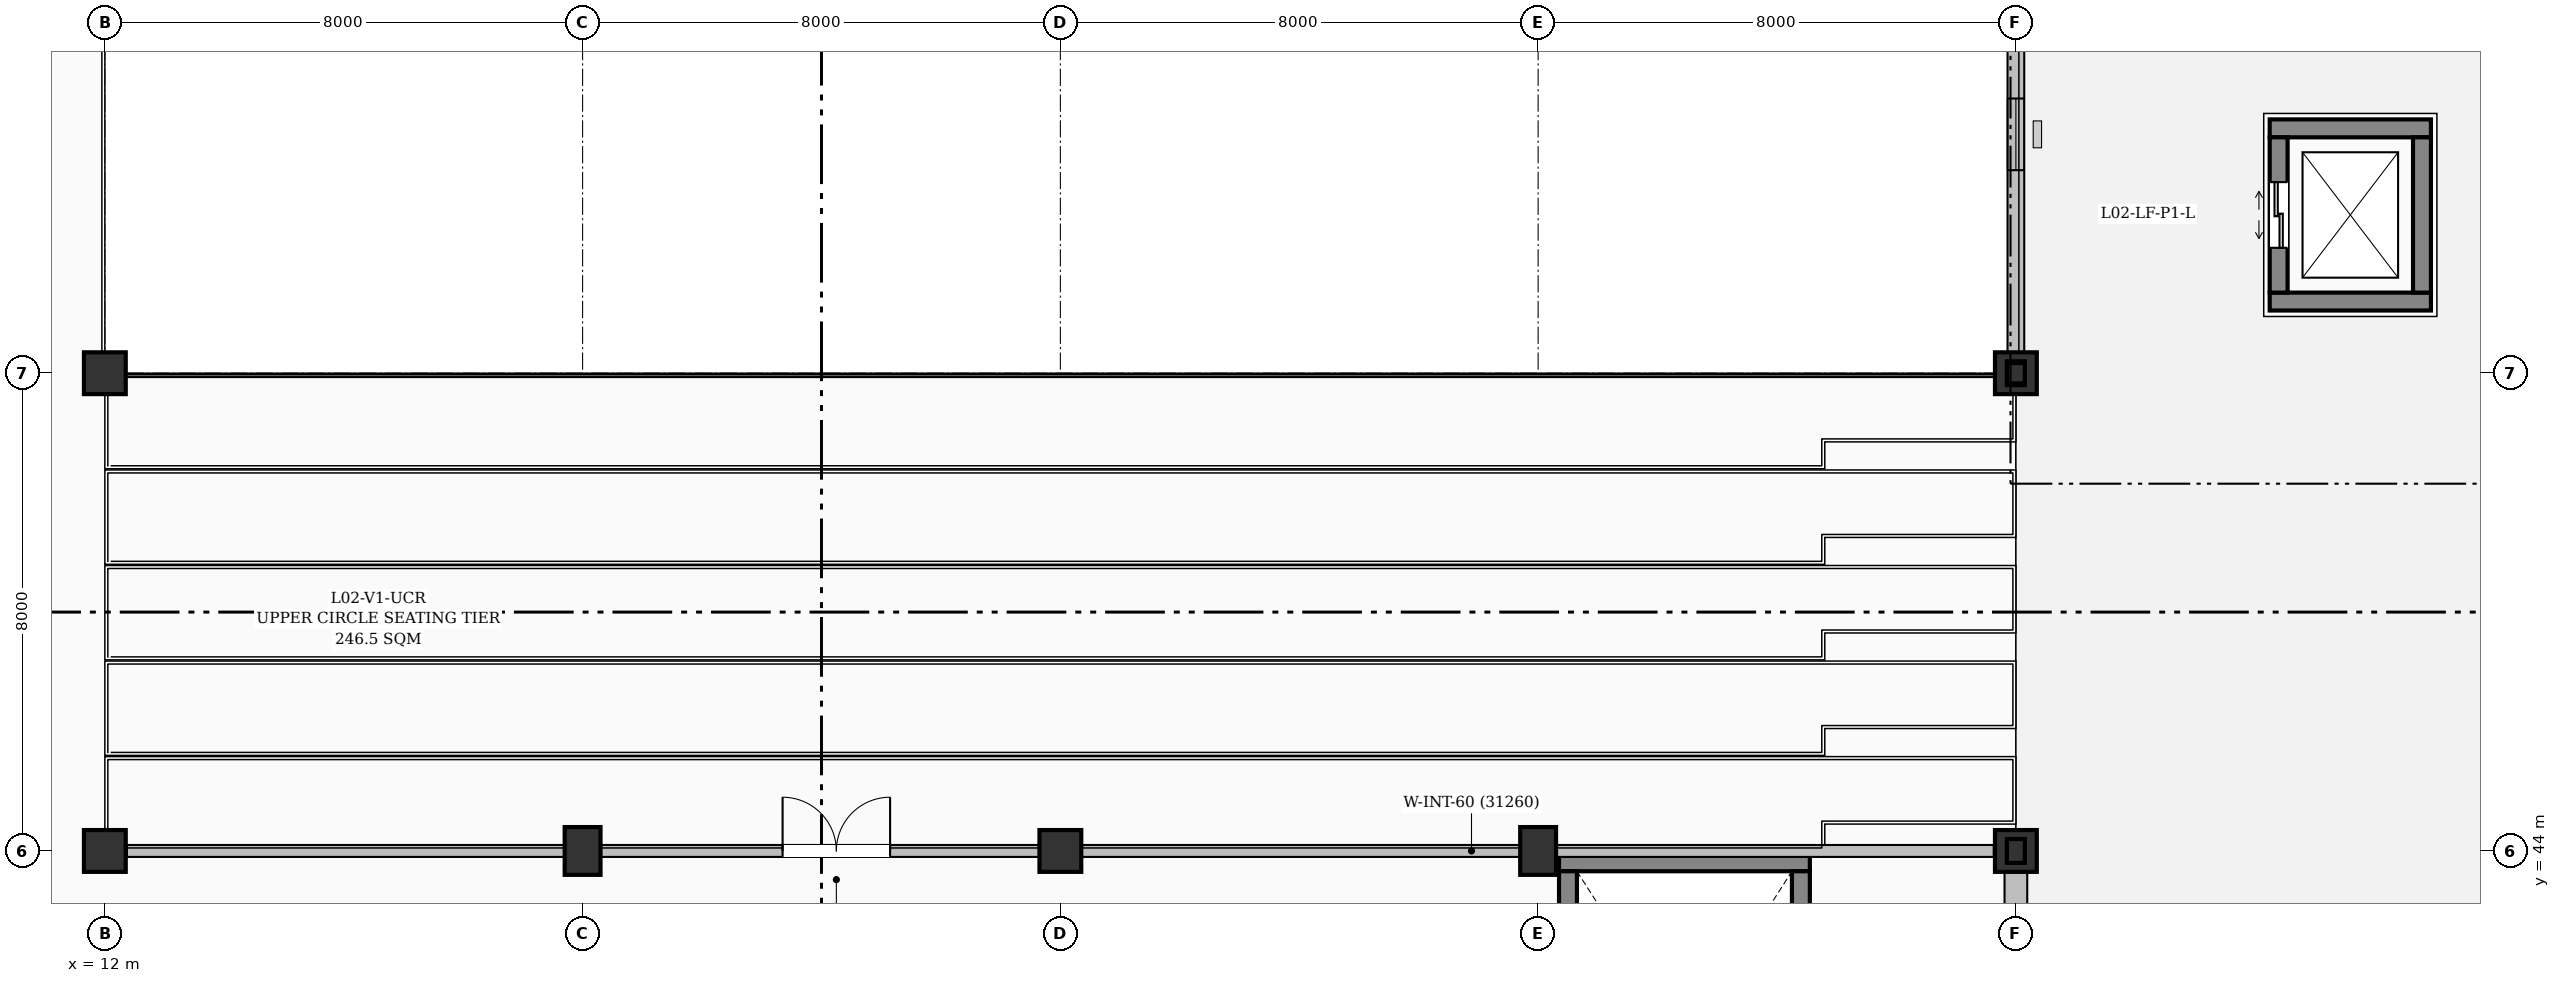
"""IFC4 building model, lengths in metres.
Left out: names, types, materials, properties, quantities, classifications, styles, units other than length and angle.
Written with IfcOpenShell. Run it as: python <this file> out.ifc"""

import sys

from ifc_helpers import new_model, si_unit, direction, frame, frame_2d, origin, origin_2d, place, context, subcontext, project, spatial, rectangle, i_section, extrude, element, fill, save


model = new_model("IFC4")
c1 = context("Model", 3, precision=1e-05, world=origin(), true_north=direction((0.0, 1.0)))
c2 = subcontext(c1, "Body", "Model", "MODEL_VIEW")
j1 = project(units=[si_unit("LENGTHUNIT", "METRE"), si_unit("PLANEANGLEUNIT", "RADIAN")], contexts=[c1])
p1 = place(None, origin())
s1 = spatial("IfcSite", under=j1, at=p1, CompositionType="ELEMENT")
p2 = place(p1, origin())
s2 = spatial("IfcBuilding", under=s1, at=p2, CompositionType="ELEMENT")
p3 = place(p2, frame((0.0, 0.0, 9.3)))
s3 = spatial("IfcBuildingStorey", under=s2, at=p3, CompositionType="ELEMENT", Elevation=9.3)
for number, where, z_axis, x_axis in (
    (1, (12.0, 44.0, 0.0), (0.0, 0.0, 1.0), (1.0, 0.0, 0.0)),
    (2, (12.0, 52.0, 0.0), (0.0, 0.0, 1.0), (1.0, 0.0, 0.0)),
):
    element("IfcColumn", number, at=place(p3, frame(where, z_axis=z_axis, x_axis=x_axis)), inside=s3, PredefinedType="COLUMN", context=c2, shape_type="SweptSolid", body=[
        extrude(rectangle(XDim=0.7, YDim=0.7, at=origin_2d()), origin(), (0.0, 0.0, 1.0), 4.5),
    ])
p4 = place(p3, frame((20.0, 44.0, 0.0), z_axis=(0.0, 0.0, 1.0), x_axis=(1.0, 0.0, 0.0)))
e3 = element("IfcColumn", 3, at=p4, inside=s3, PredefinedType="COLUMN", context=c2, shape_type="SweptSolid", body=[
    extrude(rectangle(XDim=0.6, YDim=0.8, at=origin_2d()), origin(), (0.0, 0.0, 1.0), 4.5),
])
p5 = place(p3, frame((28.0, 44.0, 0.0), z_axis=(0.0, 0.0, 1.0), x_axis=(1.0, 0.0, 0.0)))
e4 = element("IfcColumn", 4, at=p5, inside=s3, PredefinedType="COLUMN", context=c2, shape_type="SweptSolid", body=[
    extrude(rectangle(XDim=0.7, YDim=0.7, at=origin_2d()), origin(), (0.0, 0.0, 1.0), 4.5),
])
p6 = place(p3, frame((36.0, 44.0, 0.0), z_axis=(0.0, 0.0, 1.0), x_axis=(1.0, 0.0, 0.0)))
e5 = element("IfcColumn", 5, at=p6, inside=s3, PredefinedType="COLUMN", context=c2, shape_type="SweptSolid", body=[
    extrude(rectangle(XDim=0.6, YDim=0.8, at=origin_2d()), origin(), (0.0, 0.0, 1.0), 4.5),
])
for number, where, z_axis, x_axis in (
    (6, (44.0, 44.0, 0.0), (0.0, 0.0, 1.0), (1.0, 0.0, 0.0)),
    (7, (44.0, 52.0, 0.0), (0.0, 0.0, 1.0), (1.0, 0.0, 0.0)),
):
    element("IfcColumn", number, at=place(p3, frame(where, z_axis=z_axis, x_axis=x_axis)), inside=s3, PredefinedType="COLUMN", context=c2, shape_type="SweptSolid", body=[
        extrude(rectangle(XDim=0.7, YDim=0.7, at=origin_2d()), origin(), (0.0, 0.0, 1.0), 4.5),
    ])
for number, where, z_axis, x_axis in (
    (8, (44.0, 44.0, 4.5), (0.0, 0.0, 1.0), (1.0, 0.0, 0.0)),
    (9, (44.0, 52.0, 4.5), (0.0, 0.0, 1.0), (1.0, 0.0, 0.0)),
):
    element("IfcColumn", number, at=place(p3, frame(where, z_axis=z_axis, x_axis=x_axis)), inside=s3, PredefinedType="COLUMN", context=c2, shape_type="SweptSolid", body=[
        extrude(i_section(OverallWidth=0.3, OverallDepth=0.4, WebThickness=0.013, FlangeThickness=0.024, FilletRadius=0.027, at=origin_2d()), origin(), (0.0, 0.0, 1.0), 4.0),
    ])
p7 = place(p3, frame((44.0, 52.0, 8.5), z_axis=(0.0, 0.0, 1.0), x_axis=(1.0, 0.0, 0.0)))
e10 = element("IfcColumn", 10, at=p7, inside=s3, PredefinedType="COLUMN", context=c2, shape_type="SweptSolid", body=[
    extrude(i_section(OverallWidth=0.3, OverallDepth=0.34, WebThickness=0.012, FlangeThickness=0.021, FilletRadius=0.027, at=origin_2d()), origin(), (0.0, 0.0, 1.0), 2.015),
])
p8 = place(p3, frame((44.0, 59.65, 0.0), z_axis=(0.0, 0.0, 1.0), x_axis=(0.0, -1.0, 0.0)))
e11 = element("IfcWall", 11, at=p8, inside=s3, PredefinedType="SOLIDWALL", context=c2, shape_type="SweptSolid", body=[
    extrude(rectangle(XDim=7.3, YDim=0.28, at=frame_2d((3.65, 0.0))), origin(), (0.0, 0.0, 1.0), 4.12),
])
p9 = place(p8, frame((3.05, 0.0, 0.95)))
e12 = element("IfcOpeningElement", 12, at=p9, cuts=e11, PredefinedType="OPENING", context=c2, shape_type="SweptSolid", body=[
    extrude(rectangle(XDim=1.2, YDim=1.8, at=frame_2d((0.6, 0.9))), frame((0.0, 0.15, 0.0), z_axis=(0.0, -1.0, 0.0), x_axis=(1.0, 0.0, 0.0)), (0.0, 0.0, 1.0), 0.3),
])
p10 = place(p3, frame((44.0, 43.65, 0.0), z_axis=(0.0, 0.0, 1.0), x_axis=(0.0, -1.0, 0.0)))
e13 = element("IfcWall", 13, at=p10, inside=s3, PredefinedType="SOLIDWALL", context=c2, shape_type="SweptSolid", body=[
    extrude(rectangle(XDim=7.375, YDim=0.38, at=frame_2d((3.688, 0.0))), origin(), (0.0, 0.0, 1.0), 4.12),
])
p11 = place(p10, frame((2.863, 0.0, 0.0)))
e14 = element("IfcOpeningElement", 14, at=p11, cuts=e13, PredefinedType="OPENING", context=c2, shape_type="SweptSolid", body=[
    extrude(rectangle(XDim=1.65, YDim=2.25, at=frame_2d((0.825, 1.125))), frame((0.0, 0.2, 0.0), z_axis=(0.0, -1.0, 0.0), x_axis=(1.0, 0.0, 0.0)), (0.0, 0.0, 1.0), 0.4),
])
p12 = place(p3, frame((40.55, 43.81, 0.0), z_axis=(0.0, 0.0, 1.0), x_axis=(-1.0, 0.0, 0.0)))
e15 = element("IfcWall", 15, at=p12, inside=s3, PredefinedType="SHEAR", context=c2, shape_type="SweptSolid", body=[
    extrude(rectangle(XDim=4.2, YDim=0.3, at=frame_2d((2.1, 0.0))), origin(), (0.0, 0.0, 1.0), 4.25),
])
p13 = place(p3, frame((36.5, 36.34, 0.0), z_axis=(0.0, 0.0, 1.0), x_axis=(0.0, 1.0, 0.0)))
e16 = element("IfcWall", 16, at=p13, inside=s3, PredefinedType="SHEAR", context=c2, shape_type="SweptSolid", body=[
    extrude(rectangle(XDim=7.32, YDim=0.3, at=frame_2d((3.66, 0.0))), origin(), (0.0, 0.0, 1.0), 4.25),
])
p14 = place(p3, frame((40.4, 36.34, 0.0), z_axis=(0.0, 0.0, 1.0), x_axis=(0.0, 1.0, 0.0)))
e17 = element("IfcWall", 17, at=p14, inside=s3, PredefinedType="SHEAR", context=c2, shape_type="SweptSolid", body=[
    extrude(rectangle(XDim=7.32, YDim=0.3, at=frame_2d((3.66, 0.0))), origin(), (0.0, 0.0, 1.0), 4.25),
])
p15 = place(p14, frame((0.35, 0.0, 0.0)))
e18 = element("IfcOpeningElement", 18, at=p15, cuts=e17, PredefinedType="OPENING", context=c2, shape_type="SweptSolid", body=[
    extrude(rectangle(XDim=1.2, YDim=2.15, at=frame_2d((0.6, 1.075))), frame((0.0, 0.16, 0.0), z_axis=(0.0, -1.0, 0.0), x_axis=(1.0, 0.0, 0.0)), (0.0, 0.0, 1.0), 0.32),
])
for number, where, z_axis, x_axis in (
    (19, (48.25, 53.2, 0.0), (0.0, 0.0, 1.0), (1.0, 0.0, 0.0)),
    (20, (50.95, 56.1, 0.0), (0.0, 0.0, 1.0), (-1.0, 0.0, 0.0)),
):
    element("IfcWall", number, at=place(p3, frame(where, z_axis=z_axis, x_axis=x_axis)), inside=s3, PredefinedType="SHEAR", context=c2, shape_type="SweptSolid", body=[
        extrude(rectangle(XDim=2.7, YDim=0.3, at=frame_2d((1.35, 0.0))), origin(), (0.0, 0.0, 1.0), 4.25),
    ])
p16 = place(p3, frame((48.4, 53.35, 0.0), z_axis=(0.0, 0.0, 1.0), x_axis=(0.0, 1.0, 0.0)))
e21 = element("IfcWall", 21, at=p16, inside=s3, PredefinedType="SHEAR", context=c2, shape_type="SweptSolid", body=[
    extrude(rectangle(XDim=2.6, YDim=0.3, at=frame_2d((1.3, 0.0))), origin(), (0.0, 0.0, 1.0), 4.25),
])
p17 = place(p16, frame((0.75, 0.0, 0.0)))
e22 = element("IfcOpeningElement", 22, at=p17, cuts=e21, PredefinedType="OPENING", context=c2, shape_type="SweptSolid", body=[
    extrude(rectangle(XDim=1.1, YDim=2.15, at=frame_2d((0.55, 1.075))), frame((0.0, 0.16, 0.0), z_axis=(0.0, -1.0, 0.0), x_axis=(1.0, 0.0, 0.0)), (0.0, 0.0, 1.0), 0.32),
])
p18 = place(p3, frame((50.8, 55.95, 0.0), z_axis=(0.0, 0.0, 1.0), x_axis=(0.0, -1.0, 0.0)))
e23 = element("IfcWall", 23, at=p18, inside=s3, PredefinedType="SHEAR", context=c2, shape_type="SweptSolid", body=[
    extrude(rectangle(XDim=2.6, YDim=0.3, at=frame_2d((1.3, 0.0))), origin(), (0.0, 0.0, 1.0), 4.25),
])
p19 = place(p3, frame((12.37, 44.0, 0.0), z_axis=(0.0, 0.0, 1.0), x_axis=(1.0, 0.0, 0.0)))
e24 = element("IfcWall", 24, at=p19, inside=s3, PredefinedType="PARTITIONING", context=c2, shape_type="SweptSolid", body=[
    extrude(rectangle(XDim=31.26, YDim=0.2, at=frame_2d((15.63, 0.0))), origin(), (0.0, 0.0, 1.0), 4.25),
])
p20 = place(p19, frame((10.979, 0.0, 0.0)))
e25 = element("IfcOpeningElement", 25, at=p20, cuts=e24, PredefinedType="OPENING", context=c2, shape_type="SweptSolid", body=[
    extrude(rectangle(XDim=1.8, YDim=2.35, at=frame_2d((0.9, 1.175))), frame((0.0, 0.11, 0.0), z_axis=(0.0, -1.0, 0.0), x_axis=(1.0, 0.0, 0.0)), (0.0, 0.0, 1.0), 0.22),
])
p21 = place(p9, origin())
e26 = element("IfcWindow", 26, at=p21, inside=s3, PartitioningType="SINGLE_PANEL", PredefinedType="WINDOW", context=c2, shape_type="SweptSolid", body=[
    extrude(rectangle(XDim=1.2, YDim=1.8, at=frame_2d((0.6, 0.9))), frame((0.0, 0.03, 0.0), z_axis=(0.0, -1.0, 0.0), x_axis=(1.0, 0.0, 0.0)), (0.0, 0.0, 1.0), 0.06),
])
fill(e12, e26)
p22 = place(p17, origin())
e27 = element("IfcDoor", 27, at=p22, inside=s3, OperationType="DOUBLE_DOOR_SLIDING", PredefinedType="DOOR", context=c2, shape_type="SweptSolid", body=[
    extrude(rectangle(XDim=1.1, YDim=2.15, at=frame_2d((0.55, 1.075))), frame((0.0, 0.025, 0.0), z_axis=(0.0, -1.0, 0.0), x_axis=(1.0, 0.0, 0.0)), (0.0, 0.0, 1.0), 0.05),
])
fill(e22, e27)
p23 = place(p20, origin())
e28 = element("IfcDoor", 28, at=p23, inside=s3, OperationType="DOUBLE_DOOR_SINGLE_SWING", PredefinedType="DOOR", context=c2, shape_type="SweptSolid", body=[
    extrude(rectangle(XDim=1.8, YDim=2.35, at=frame_2d((0.9, 1.175))), frame((0.0, 0.025, 0.0), z_axis=(0.0, -1.0, 0.0), x_axis=(1.0, 0.0, 0.0)), (0.0, 0.0, 1.0), 0.05),
])
fill(e25, e28)
save(model, sys.argv[1])
